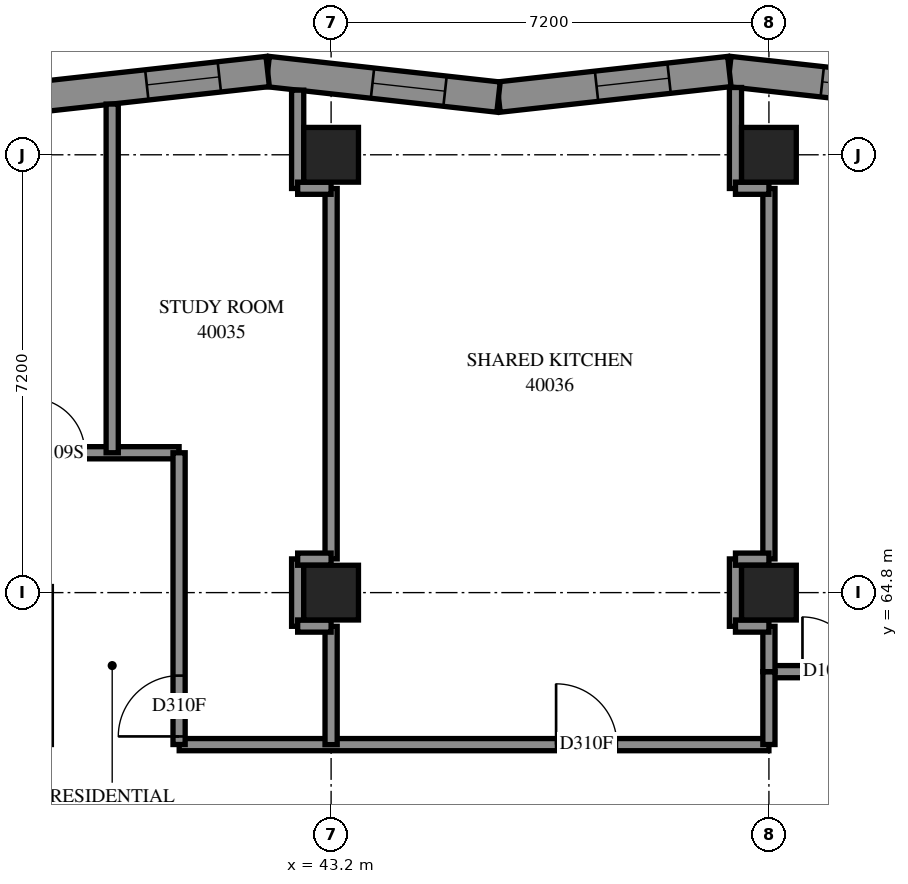
"""IFC4 building model, lengths in metres.
Left out: names, types, materials, properties, quantities, classifications, styles, units other than length and angle.
Written with IfcOpenShell. Run it as: python <this file> out.ifc"""

import sys

from ifc_helpers import new_model, si_unit, direction, frame, frame_2d, origin, origin_2d, place, context, subcontext, project, spatial, polyline, rectangle, outline, extrude, element, fill, save


model = new_model("IFC4")
c1 = context("Model", 3, precision=1e-05, world=origin(), true_north=direction((0.0, 1.0)))
c2 = subcontext(c1, "Body", "Model", "MODEL_VIEW")
j1 = project(units=[si_unit("LENGTHUNIT", "METRE"), si_unit("PLANEANGLEUNIT", "RADIAN")], contexts=[c1])
p1 = place(None, origin())
s1 = spatial("IfcSite", under=j1, at=p1, CompositionType="ELEMENT")
p2 = place(p1, origin())
s2 = spatial("IfcBuilding", under=s1, at=p2, CompositionType="ELEMENT")
p3 = place(p2, frame((0.0, 0.0, 149.0)))
s3 = spatial("IfcBuildingStorey", under=s2, at=p3, CompositionType="ELEMENT", Elevation=149.0)
for number, where, z_axis, x_axis in (
    (1, (43.2, 64.8, 0.0), (0.0, 0.0, 1.0), (1.0, 0.0, 0.0)),
    (2, (43.2, 72.0, 0.0), (0.0, 0.0, 1.0), (1.0, 0.0, 0.0)),
    (3, (50.4, 64.8, 0.0), (0.0, 0.0, 1.0), (1.0, 0.0, 0.0)),
    (4, (50.4, 72.0, 0.0), (0.0, 0.0, 1.0), (1.0, 0.0, 0.0)),
):
    element("IfcColumn", number, at=place(p3, frame(where, z_axis=z_axis, x_axis=x_axis)), inside=s3, PredefinedType="COLUMN", context=c2, shape_type="SweptSolid", body=[
        extrude(rectangle(XDim=0.9, YDim=0.9, at=origin_2d()), origin(), (0.0, 0.0, 1.0), 3.1),
    ])
p4 = place(p3, frame((53.546, 72.948, 0.0), z_axis=(0.0, 0.0, 1.0), x_axis=(-0.99390702, 0.1102217568, 0.0)))
e5 = element("IfcWall", 5, at=p4, inside=s3, PredefinedType="SOLIDWALL", context=c2, shape_type="SweptSolid", body=[
    extrude(outline(polyline([(0.028, -0.25), (3.847, -0.25), (3.792, 0.25), (-0.028, 0.25), (0.028, -0.25)])), origin(), (0.0, 0.0, 1.0), 3.1),
])
p5 = place(p4, frame((1.083, 0.0, 0.45)))
e6 = element("IfcOpeningElement", 6, at=p5, cuts=e5, PredefinedType="OPENING", context=c2, shape_type="SweptSolid", body=[
    extrude(rectangle(XDim=1.2, YDim=2.5, at=frame_2d((0.6, 1.25))), frame((0.0, 0.26, 0.0), z_axis=(0.0, -1.0, 0.0), x_axis=(1.0, 0.0, 0.0)), (0.0, 0.0, 1.0), 0.52),
])
p6 = place(p3, frame((49.749, 73.37, 0.0), z_axis=(0.0, 0.0, 1.0), x_axis=(-0.99390702, -0.1102217568, 0.0)))
e7 = element("IfcWall", 7, at=p6, inside=s3, PredefinedType="SOLIDWALL", context=c2, shape_type="SweptSolid", body=[
    extrude(outline(polyline([(-0.028, -0.25), (3.792, -0.25), (3.847, 0.25), (0.028, 0.25), (-0.028, -0.25)])), origin(), (0.0, 0.0, 1.0), 3.1),
])
p7 = place(p6, frame((0.998, 0.0, 0.45)))
e8 = element("IfcOpeningElement", 8, at=p7, cuts=e7, PredefinedType="OPENING", context=c2, shape_type="SweptSolid", body=[
    extrude(rectangle(XDim=1.2, YDim=2.5, at=frame_2d((0.6, 1.25))), frame((0.0, 0.26, 0.0), z_axis=(0.0, -1.0, 0.0), x_axis=(1.0, 0.0, 0.0)), (0.0, 0.0, 1.0), 0.52),
])
p8 = place(p3, frame((45.953, 72.948, 0.0), z_axis=(0.0, 0.0, 1.0), x_axis=(-0.99390702, 0.1102217568, 0.0)))
e9 = element("IfcWall", 9, at=p8, inside=s3, PredefinedType="SOLIDWALL", context=c2, shape_type="SweptSolid", body=[
    extrude(outline(polyline([(0.028, -0.25), (3.847, -0.25), (3.792, 0.25), (-0.028, 0.25), (0.028, -0.25)])), origin(), (0.0, 0.0, 1.0), 3.1),
])
p9 = place(p8, frame((0.885, 0.0, 0.45)))
e10 = element("IfcOpeningElement", 10, at=p9, cuts=e9, PredefinedType="OPENING", context=c2, shape_type="SweptSolid", body=[
    extrude(rectangle(XDim=1.2, YDim=2.5, at=frame_2d((0.6, 1.25))), frame((0.0, 0.26, 0.0), z_axis=(0.0, -1.0, 0.0), x_axis=(1.0, 0.0, 0.0)), (0.0, 0.0, 1.0), 0.52),
])
p10 = place(p3, frame((42.157, 73.37, 0.0), z_axis=(0.0, 0.0, 1.0), x_axis=(-0.99390702, -0.1102217568, 0.0)))
e11 = element("IfcWall", 11, at=p10, inside=s3, PredefinedType="SOLIDWALL", context=c2, shape_type="SweptSolid", body=[
    extrude(outline(polyline([(-0.028, -0.25), (3.792, -0.25), (3.847, 0.25), (0.028, 0.25), (-0.028, -0.25)])), origin(), (0.0, 0.0, 1.0), 3.1),
])
p11 = place(p10, frame((0.8, 0.0, 0.45)))
e12 = element("IfcOpeningElement", 12, at=p11, cuts=e11, PredefinedType="OPENING", context=c2, shape_type="SweptSolid", body=[
    extrude(rectangle(XDim=1.2, YDim=2.5, at=frame_2d((0.6, 1.25))), frame((0.0, 0.26, 0.0), z_axis=(0.0, -1.0, 0.0), x_axis=(1.0, 0.0, 0.0)), (0.0, 0.0, 1.0), 0.52),
])
p12 = place(p3, frame((21.602, 67.1, 0.0), z_axis=(0.0, 0.0, 1.0), x_axis=(1.0, 0.0, 0.0)))
e13 = element("IfcWall", 13, at=p12, inside=s3, PredefinedType="PARTITIONING", context=c2, shape_type="SweptSolid", body=[
    extrude(rectangle(XDim=19.098, YDim=0.2, at=frame_2d((9.549, 0.0))), origin(), (0.0, 0.0, 1.0), 3.1),
])
p13 = place(p12, frame((3.998, 0.0, 0.0)))
e14 = element("IfcOpeningElement", 14, at=p13, cuts=e13, PredefinedType="OPENING", context=c2, shape_type="SweptSolid", body=[
    extrude(rectangle(XDim=0.9, YDim=2.1, at=frame_2d((0.45, 1.05))), frame((0.0, 0.11, 0.0), z_axis=(0.0, -1.0, 0.0), x_axis=(1.0, 0.0, 0.0)), (0.0, 0.0, 1.0), 0.22),
])
p14 = place(p12, frame((11.399, 0.0, 0.0)))
e15 = element("IfcOpeningElement", 15, at=p14, cuts=e13, PredefinedType="OPENING", context=c2, shape_type="SweptSolid", body=[
    extrude(rectangle(XDim=0.9, YDim=2.1, at=frame_2d((0.45, 1.05))), frame((0.0, 0.11, 0.0), z_axis=(0.0, -1.0, 0.0), x_axis=(1.0, 0.0, 0.0)), (0.0, 0.0, 1.0), 0.22),
])
p15 = place(p12, frame((16.648, 0.0, 0.0)))
e16 = element("IfcOpeningElement", 16, at=p15, cuts=e13, PredefinedType="OPENING", context=c2, shape_type="SweptSolid", body=[
    extrude(rectangle(XDim=0.9, YDim=2.1, at=frame_2d((0.45, 1.05))), frame((0.0, 0.11, 0.0), z_axis=(0.0, -1.0, 0.0), x_axis=(1.0, 0.0, 0.0)), (0.0, 0.0, 1.0), 0.22),
])
p16 = place(p3, frame((40.702, 62.3, 0.0), z_axis=(0.0, 0.0, 1.0), x_axis=(1.0, 0.0, 0.0)))
e17 = element("IfcWall", 17, at=p16, inside=s3, PredefinedType="PARTITIONING", context=c2, shape_type="SweptSolid", body=[
    extrude(rectangle(XDim=9.698, YDim=0.2, at=frame_2d((4.849, 0.0))), origin(), (0.0, 0.0, 1.0), 3.1),
])
p17 = place(p16, frame((6.198, 0.0, 0.0)))
e18 = element("IfcOpeningElement", 18, at=p17, cuts=e17, PredefinedType="OPENING", context=c2, shape_type="SweptSolid", body=[
    extrude(rectangle(XDim=1.0, YDim=2.1, at=frame_2d((0.5, 1.05))), frame((0.0, 0.11, 0.0), z_axis=(0.0, -1.0, 0.0), x_axis=(1.0, 0.0, 0.0)), (0.0, 0.0, 1.0), 0.22),
])
for number, where, z_axis, x_axis in (
    (19, (43.2, 65.354, 0.0), (0.0, 0.0, 1.0), (0.0, 1.0, 0.0)),
    (20, (50.4, 65.354, 0.0), (0.0, 0.0, 1.0), (0.0, 1.0, 0.0)),
):
    element("IfcWall", number, at=place(p3, frame(where, z_axis=z_axis, x_axis=x_axis)), inside=s3, PredefinedType="PARTITIONING", context=c2, shape_type="SweptSolid", body=[
        extrude(rectangle(XDim=6.092, YDim=0.2, at=frame_2d((3.046, 0.0))), origin(), (0.0, 0.0, 1.0), 3.1),
    ])
p18 = place(p3, frame((39.6, 67.1, 0.0), z_axis=(0.0, 0.0, 1.0), x_axis=(0.0, 1.0, 0.0)))
e21 = element("IfcWall", 21, at=p18, inside=s3, PredefinedType="PARTITIONING", context=c2, shape_type="SweptSolid", body=[
    extrude(rectangle(XDim=5.734, YDim=0.2, at=frame_2d((2.867, 0.0))), origin(), (0.0, 0.0, 1.0), 3.1),
])
p19 = place(p3, frame((50.4, 63.5, 0.0), z_axis=(0.0, 0.0, 1.0), x_axis=(1.0, 0.0, 0.0)))
e22 = element("IfcWall", 22, at=p19, inside=s3, PredefinedType="PARTITIONING", context=c2, shape_type="SweptSolid", body=[
    extrude(rectangle(XDim=5.1, YDim=0.2, at=frame_2d((2.55, 0.0))), origin(), (0.0, 0.0, 1.0), 3.1),
])
p20 = place(p19, frame((0.552, 0.0, 0.0)))
e23 = element("IfcOpeningElement", 23, at=p20, cuts=e22, PredefinedType="OPENING", context=c2, shape_type="SweptSolid", body=[
    extrude(rectangle(XDim=0.9, YDim=2.1, at=frame_2d((0.45, 1.05))), frame((0.0, 0.11, 0.0), z_axis=(0.0, -1.0, 0.0), x_axis=(1.0, 0.0, 0.0)), (0.0, 0.0, 1.0), 0.22),
])
p21 = place(p19, frame((3.941, 0.0, 0.0)))
e24 = element("IfcOpeningElement", 24, at=p21, cuts=e22, PredefinedType="OPENING", context=c2, shape_type="SweptSolid", body=[
    extrude(rectangle(XDim=1.0, YDim=2.1, at=frame_2d((0.5, 1.05))), frame((0.0, 0.11, 0.0), z_axis=(0.0, -1.0, 0.0), x_axis=(1.0, 0.0, 0.0)), (0.0, 0.0, 1.0), 0.22),
])
p22 = place(p3, frame((40.7, 62.302, 0.0), z_axis=(0.0, 0.0, 1.0), x_axis=(0.0, 1.0, 0.0)))
e25 = element("IfcWall", 25, at=p22, inside=s3, PredefinedType="PARTITIONING", context=c2, shape_type="SweptSolid", body=[
    extrude(rectangle(XDim=4.798, YDim=0.2, at=frame_2d((2.399, 0.0))), origin(), (0.0, 0.0, 1.0), 3.1),
])
p23 = place(p22, frame((0.133, 0.0, 0.0)))
e26 = element("IfcOpeningElement", 26, at=p23, cuts=e25, PredefinedType="OPENING", context=c2, shape_type="SweptSolid", body=[
    extrude(rectangle(XDim=1.0, YDim=2.1, at=frame_2d((0.5, 1.05))), frame((0.0, 0.11, 0.0), z_axis=(0.0, -1.0, 0.0), x_axis=(1.0, 0.0, 0.0)), (0.0, 0.0, 1.0), 0.22),
])
p24 = place(p3, frame((43.2, 62.3, 0.0), z_axis=(0.0, 0.0, 1.0), x_axis=(0.0, 1.0, 0.0)))
e27 = element("IfcWall", 27, at=p24, inside=s3, PredefinedType="PARTITIONING", context=c2, shape_type="SweptSolid", body=[
    extrude(rectangle(XDim=1.946, YDim=0.2, at=frame_2d((0.973, 0.0))), origin(), (0.0, 0.0, 1.0), 3.1),
])
p25 = place(p3, frame((49.85, 71.446, 0.0), z_axis=(0.0, 0.0, 1.0), x_axis=(0.0, 1.0, 0.0)))
e28 = element("IfcWall", 28, at=p25, inside=s3, PredefinedType="PARTITIONING", context=c2, shape_type="SweptSolid", body=[
    extrude(rectangle(XDim=1.661, YDim=0.2, at=frame_2d((0.83, 0.0))), origin(), (0.0, 0.0, 1.0), 3.1),
])
p26 = place(p3, frame((42.65, 71.446, 0.0), z_axis=(0.0, 0.0, 1.0), x_axis=(0.0, 1.0, 0.0)))
e29 = element("IfcWall", 29, at=p26, inside=s3, PredefinedType="PARTITIONING", context=c2, shape_type="SweptSolid", body=[
    extrude(rectangle(XDim=1.617, YDim=0.2, at=frame_2d((0.809, 0.0))), origin(), (0.0, 0.0, 1.0), 3.1),
])
p27 = place(p3, frame((50.4, 62.302, 0.0), z_axis=(0.0, 0.0, 1.0), x_axis=(0.0, 1.0, 0.0)))
e30 = element("IfcWall", 30, at=p27, inside=s3, PredefinedType="PARTITIONING", context=c2, shape_type="SweptSolid", body=[
    extrude(rectangle(XDim=1.198, YDim=0.2, at=frame_2d((0.599, 0.0))), origin(), (0.0, 0.0, 1.0), 3.1),
])
for number, where, z_axis, x_axis in (
    (31, (42.65, 64.246, 0.0), (0.0, 0.0, 1.0), (0.0, 1.0, 0.0)),
    (32, (49.85, 64.246, 0.0), (0.0, 0.0, 1.0), (0.0, 1.0, 0.0)),
):
    element("IfcWall", number, at=place(p3, frame(where, z_axis=z_axis, x_axis=x_axis)), inside=s3, PredefinedType="PARTITIONING", context=c2, shape_type="SweptSolid", body=[
        extrude(rectangle(XDim=1.108, YDim=0.2, at=frame_2d((0.554, 0.0))), origin(), (0.0, 0.0, 1.0), 3.1),
    ])
p28 = place(p3, frame((50.4, 63.5, 0.0), z_axis=(0.0, 0.0, 1.0), x_axis=(0.0, 1.0, 0.0)))
e33 = element("IfcWall", 33, at=p28, inside=s3, PredefinedType="PARTITIONING", context=c2, shape_type="SweptSolid", body=[
    extrude(rectangle(XDim=0.746, YDim=0.2, at=frame_2d((0.373, 0.0))), origin(), (0.0, 0.0, 1.0), 3.1),
])
for number, where, z_axis, x_axis in (
    (34, (42.65, 71.45, 0.0), (0.0, 0.0, 1.0), (1.0, 0.0, 0.0)),
    (35, (42.65, 65.35, 0.0), (0.0, 0.0, 1.0), (1.0, 0.0, 0.0)),
    (36, (42.65, 64.25, 0.0), (0.0, 0.0, 1.0), (1.0, 0.0, 0.0)),
    (37, (49.85, 71.45, 0.0), (0.0, 0.0, 1.0), (1.0, 0.0, 0.0)),
    (38, (49.85, 65.35, 0.0), (0.0, 0.0, 1.0), (1.0, 0.0, 0.0)),
    (39, (49.85, 64.25, 0.0), (0.0, 0.0, 1.0), (1.0, 0.0, 0.0)),
):
    element("IfcWall", number, at=place(p3, frame(where, z_axis=z_axis, x_axis=x_axis)), inside=s3, PredefinedType="PARTITIONING", context=c2, shape_type="SweptSolid", body=[
        extrude(rectangle(XDim=0.55, YDim=0.2, at=frame_2d((0.275, 0.0))), origin(), (0.0, 0.0, 1.0), 3.1),
    ])
p29 = place(p5, origin())
e40 = element("IfcWindow", 40, at=p29, inside=s3, PartitioningType="SINGLE_PANEL", PredefinedType="WINDOW", context=c2, shape_type="SweptSolid", body=[
    extrude(rectangle(XDim=1.2, YDim=2.5, at=frame_2d((0.6, 1.25))), frame((0.0, 0.18, 0.0), z_axis=(0.0, -1.0, 0.0), x_axis=(1.0, 0.0, 0.0)), (0.0, 0.0, 1.0), 0.06),
])
fill(e6, e40)
p30 = place(p7, origin())
e41 = element("IfcWindow", 41, at=p30, inside=s3, PartitioningType="SINGLE_PANEL", PredefinedType="WINDOW", context=c2, shape_type="SweptSolid", body=[
    extrude(rectangle(XDim=1.2, YDim=2.5, at=frame_2d((0.6, 1.25))), frame((0.0, 0.18, 0.0), z_axis=(0.0, -1.0, 0.0), x_axis=(1.0, 0.0, 0.0)), (0.0, 0.0, 1.0), 0.06),
])
fill(e8, e41)
p31 = place(p9, origin())
e42 = element("IfcWindow", 42, at=p31, inside=s3, PartitioningType="SINGLE_PANEL", PredefinedType="WINDOW", context=c2, shape_type="SweptSolid", body=[
    extrude(rectangle(XDim=1.2, YDim=2.5, at=frame_2d((0.6, 1.25))), frame((0.0, 0.18, 0.0), z_axis=(0.0, -1.0, 0.0), x_axis=(1.0, 0.0, 0.0)), (0.0, 0.0, 1.0), 0.06),
])
fill(e10, e42)
p32 = place(p11, origin())
e43 = element("IfcWindow", 43, at=p32, inside=s3, PartitioningType="SINGLE_PANEL", PredefinedType="WINDOW", context=c2, shape_type="SweptSolid", body=[
    extrude(rectangle(XDim=1.2, YDim=2.5, at=frame_2d((0.6, 1.25))), frame((0.0, 0.18, 0.0), z_axis=(0.0, -1.0, 0.0), x_axis=(1.0, 0.0, 0.0)), (0.0, 0.0, 1.0), 0.06),
])
fill(e12, e43)
p33 = place(p15, origin())
e44 = element("IfcDoor", 44, at=p33, inside=s3, OperationType="SINGLE_SWING_RIGHT", PredefinedType="DOOR", context=c2, shape_type="SweptSolid", body=[
    extrude(rectangle(XDim=0.9, YDim=2.1, at=frame_2d((0.45, 1.05))), frame((0.0, 0.025, 0.0), z_axis=(0.0, -1.0, 0.0), x_axis=(1.0, 0.0, 0.0)), (0.0, 0.0, 1.0), 0.05),
])
fill(e16, e44)
p34 = place(p23, origin())
e45 = element("IfcDoor", 45, at=p34, inside=s3, OperationType="SINGLE_SWING_LEFT", PredefinedType="DOOR", context=c2, shape_type="SweptSolid", body=[
    extrude(rectangle(XDim=1.0, YDim=2.1, at=frame_2d((0.5, 1.05))), frame((0.0, 0.025, 0.0), z_axis=(0.0, -1.0, 0.0), x_axis=(1.0, 0.0, 0.0)), (0.0, 0.0, 1.0), 0.05),
])
fill(e26, e45)
p35 = place(p17, origin())
e46 = element("IfcDoor", 46, at=p35, inside=s3, OperationType="SINGLE_SWING_RIGHT", PredefinedType="DOOR", context=c2, shape_type="SweptSolid", body=[
    extrude(rectangle(XDim=1.0, YDim=2.1, at=frame_2d((0.5, 1.05))), frame((0.0, 0.025, 0.0), z_axis=(0.0, -1.0, 0.0), x_axis=(1.0, 0.0, 0.0)), (0.0, 0.0, 1.0), 0.05),
])
fill(e18, e46)
p36 = place(p20, origin())
e47 = element("IfcDoor", 47, at=p36, inside=s3, OperationType="SINGLE_SWING_RIGHT", PredefinedType="DOOR", context=c2, shape_type="SweptSolid", body=[
    extrude(rectangle(XDim=0.9, YDim=2.1, at=frame_2d((0.45, 1.05))), frame((0.0, 0.025, 0.0), z_axis=(0.0, -1.0, 0.0), x_axis=(1.0, 0.0, 0.0)), (0.0, 0.0, 1.0), 0.05),
])
fill(e23, e47)
save(model, sys.argv[1])
